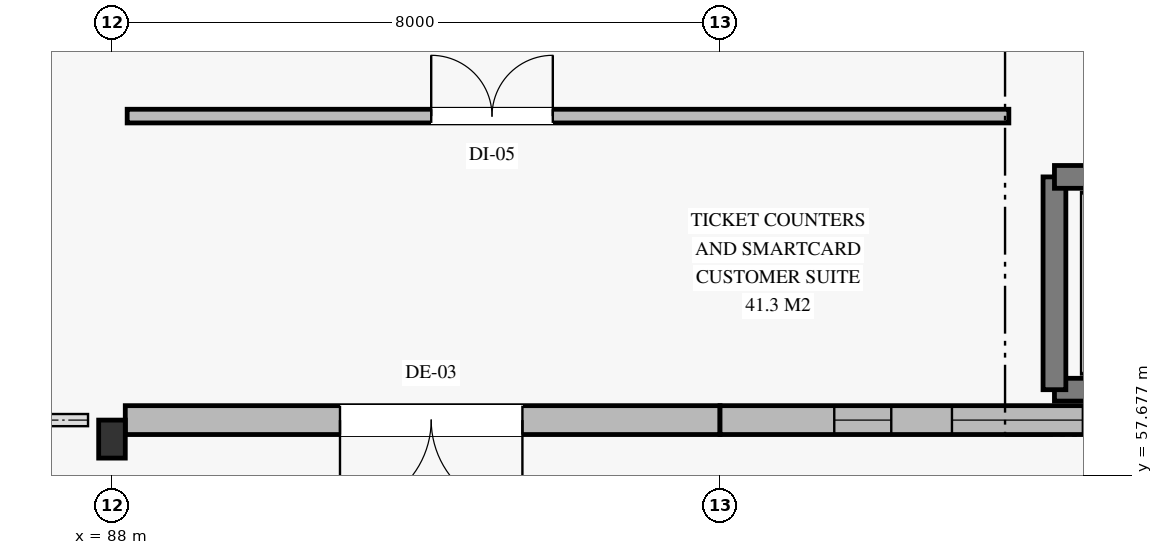
"""IFC4 building model, lengths in metres.
Left out: names, types, materials, properties, quantities, classifications, styles, units other than length and angle.
Written with IfcOpenShell. Run it as: python <this file> out.ifc"""

import sys

from ifc_helpers import new_model, si_unit, direction, frame, frame_2d, origin, origin_2d, place, context, subcontext, project, spatial, rectangle, extrude, element, fill, save


model = new_model("IFC4")
c1 = context("Model", 3, precision=1e-05, world=origin(), true_north=direction((0.0, 1.0)))
c2 = subcontext(c1, "Body", "Model", "MODEL_VIEW")
j1 = project(units=[si_unit("LENGTHUNIT", "METRE"), si_unit("PLANEANGLEUNIT", "RADIAN")], contexts=[c1])
p1 = place(None, origin())
s1 = spatial("IfcSite", under=j1, at=p1, CompositionType="ELEMENT")
p2 = place(p1, origin())
s2 = spatial("IfcBuilding", under=s1, at=p2, CompositionType="ELEMENT")
p3 = place(p2, origin())
s3 = spatial("IfcBuildingStorey", under=s2, at=p3, CompositionType="ELEMENT", Elevation=0.0)
p4 = place(p3, frame((88.0, 58.15, 0.0), z_axis=(0.0, 0.0, 1.0), x_axis=(1.0, 0.0, 0.0)))
e1 = element("IfcColumn", 1, at=p4, inside=s3, PredefinedType="PILASTER", context=c2, shape_type="SweptSolid", body=[
    extrude(rectangle(XDim=0.35, YDim=0.5, at=origin_2d()), origin(), (0.0, 0.0, 1.0), 4.8),
])
p5 = place(p3, frame((96.0, 58.4, 0.0), z_axis=(0.0, 0.0, 1.0), x_axis=(-1.0, 0.0, 0.0)))
e2 = element("IfcWall", 2, at=p5, inside=s3, PredefinedType="STANDARD", context=c2, shape_type="SweptSolid", body=[
    extrude(rectangle(XDim=7.825, YDim=0.38, at=frame_2d((3.913, 0.0))), origin(), (0.0, 0.0, 1.0), 4.05),
])
p6 = place(p5, frame((2.6, 0.0, 0.0)))
e3 = element("IfcOpeningElement", 3, at=p6, cuts=e2, PredefinedType="OPENING", context=c2, shape_type="SweptSolid", body=[
    extrude(rectangle(XDim=2.4, YDim=2.7, at=frame_2d((1.2, 1.35))), frame((0.0, 0.2, 0.0), z_axis=(0.0, -1.0, 0.0), x_axis=(1.0, 0.0, 0.0)), (0.0, 0.0, 1.0), 0.4),
])
p7 = place(p3, frame((103.825, 58.4, 0.0), z_axis=(0.0, 0.0, 1.0), x_axis=(-1.0, 0.0, 0.0)))
e4 = element("IfcWall", 4, at=p7, inside=s3, PredefinedType="STANDARD", context=c2, shape_type="SweptSolid", body=[
    extrude(rectangle(XDim=7.825, YDim=0.38, at=frame_2d((3.913, 0.0))), origin(), (0.0, 0.0, 1.0), 4.5),
])
p8 = place(p7, frame((1.388, 0.0, 0.72)))
e5 = element("IfcOpeningElement", 5, at=p8, cuts=e4, PredefinedType="OPENING", context=c2, shape_type="SweptSolid", body=[
    extrude(rectangle(XDim=0.98, YDim=2.15, at=frame_2d((0.49, 1.075))), frame((0.0, 0.2, 0.0), z_axis=(0.0, -1.0, 0.0), x_axis=(1.0, 0.0, 0.0)), (0.0, 0.0, 1.0), 0.4),
])
p9 = place(p7, frame((3.052, 0.0, 0.72)))
e6 = element("IfcOpeningElement", 6, at=p9, cuts=e4, PredefinedType="OPENING", context=c2, shape_type="SweptSolid", body=[
    extrude(rectangle(XDim=1.722, YDim=1.2, at=frame_2d((0.861, 0.6))), frame((0.0, 0.2, 0.0), z_axis=(0.0, -1.0, 0.0), x_axis=(1.0, 0.0, 0.0)), (0.0, 0.0, 1.0), 0.4),
])
p10 = place(p7, frame((5.572, 0.0, 0.72)))
e7 = element("IfcOpeningElement", 7, at=p10, cuts=e4, PredefinedType="OPENING", context=c2, shape_type="SweptSolid", body=[
    extrude(rectangle(XDim=0.75, YDim=2.2, at=frame_2d((0.375, 1.1))), frame((0.0, 0.2, 0.0), z_axis=(0.0, -1.0, 0.0), x_axis=(1.0, 0.0, 0.0)), (0.0, 0.0, 1.0), 0.4),
])
for number, where, z_axis, x_axis in (
    (8, (103.2, 58.8, 0.0), (0.0, 0.0, 1.0), (-1.0, 0.0, 0.0)),
    (9, (100.4, 58.8, 0.0), (0.0, 0.0, 1.0), (0.0, 1.0, 0.0)),
):
    element("IfcWall", number, at=place(p3, frame(where, z_axis=z_axis, x_axis=x_axis)), inside=s3, PredefinedType="SHEAR", context=c2, shape_type="SweptSolid", body=[
        extrude(rectangle(XDim=2.8, YDim=0.3, at=frame_2d((1.4, 0.0))), origin(), (0.0, 0.0, 1.0), 4.54),
    ])
p11 = place(p3, frame((100.4, 61.6, 0.0), z_axis=(0.0, 0.0, 1.0), x_axis=(1.0, 0.0, 0.0)))
e10 = element("IfcWall", 10, at=p11, inside=s3, PredefinedType="SHEAR", context=c2, shape_type="SweptSolid", body=[
    extrude(rectangle(XDim=2.8, YDim=0.3, at=frame_2d((1.4, 0.0))), origin(), (0.0, 0.0, 1.0), 4.54),
])
p12 = place(p11, frame((0.85, 0.0, 0.0)))
e11 = element("IfcOpeningElement", 11, at=p12, cuts=e10, PredefinedType="OPENING", context=c2, shape_type="SweptSolid", body=[
    extrude(rectangle(XDim=1.1, YDim=2.2, at=frame_2d((0.55, 1.1))), frame((0.0, 0.16, 0.0), z_axis=(0.0, -1.0, 0.0), x_axis=(1.0, 0.0, 0.0)), (0.0, 0.0, 1.0), 0.32),
])
p13 = place(p3, frame((88.2, 62.4, 0.0), z_axis=(0.0, 0.0, 1.0), x_axis=(1.0, 0.0, 0.0)))
e12 = element("IfcWall", 12, at=p13, inside=s3, PredefinedType="PARTITIONING", context=c2, shape_type="SweptSolid", body=[
    extrude(rectangle(XDim=11.6, YDim=0.18, at=frame_2d((5.8, 0.0))), origin(), (0.0, 0.0, 1.0), 2.842),
])
p14 = place(p13, frame((4.0, 0.0, 0.0)))
e13 = element("IfcOpeningElement", 13, at=p14, cuts=e12, PredefinedType="OPENING", context=c2, shape_type="SweptSolid", body=[
    extrude(rectangle(XDim=1.6, YDim=2.3, at=frame_2d((0.8, 1.15))), frame((0.0, 0.1, 0.0), z_axis=(0.0, -1.0, 0.0), x_axis=(1.0, 0.0, 0.0)), (0.0, 0.0, 1.0), 0.2),
])
p15 = place(p6, origin())
e14 = element("IfcDoor", 14, at=p15, inside=s3, OperationType="DOUBLE_DOOR_SINGLE_SWING", PredefinedType="DOOR", context=c2, shape_type="SweptSolid", body=[
    extrude(rectangle(XDim=2.4, YDim=2.7, at=frame_2d((1.2, 1.35))), frame((0.0, 0.025, 0.0), z_axis=(0.0, -1.0, 0.0), x_axis=(1.0, 0.0, 0.0)), (0.0, 0.0, 1.0), 0.05),
])
fill(e3, e14)
p16 = place(p9, origin())
e15 = element("IfcWindow", 15, at=p16, inside=s3, PartitioningType="SINGLE_PANEL", PredefinedType="WINDOW", context=c2, shape_type="SweptSolid", body=[
    extrude(rectangle(XDim=1.722, YDim=1.2, at=frame_2d((0.861, 0.6))), frame((0.0, 0.03, 0.0), z_axis=(0.0, -1.0, 0.0), x_axis=(1.0, 0.0, 0.0)), (0.0, 0.0, 1.0), 0.06),
])
fill(e6, e15)
p17 = place(p10, origin())
e16 = element("IfcWindow", 16, at=p17, inside=s3, PartitioningType="SINGLE_PANEL", PredefinedType="WINDOW", context=c2, shape_type="SweptSolid", body=[
    extrude(rectangle(XDim=0.75, YDim=2.2, at=frame_2d((0.375, 1.1))), frame((0.0, 0.03, 0.0), z_axis=(0.0, -1.0, 0.0), x_axis=(1.0, 0.0, 0.0)), (0.0, 0.0, 1.0), 0.06),
])
fill(e7, e16)
p18 = place(p14, origin())
e17 = element("IfcDoor", 17, at=p18, inside=s3, OperationType="DOUBLE_DOOR_SINGLE_SWING", PredefinedType="DOOR", context=c2, shape_type="SweptSolid", body=[
    extrude(rectangle(XDim=1.6, YDim=2.3, at=frame_2d((0.8, 1.15))), frame((0.0, 0.025, 0.0), z_axis=(0.0, -1.0, 0.0), x_axis=(1.0, 0.0, 0.0)), (0.0, 0.0, 1.0), 0.05),
])
fill(e13, e17)
save(model, sys.argv[1])
